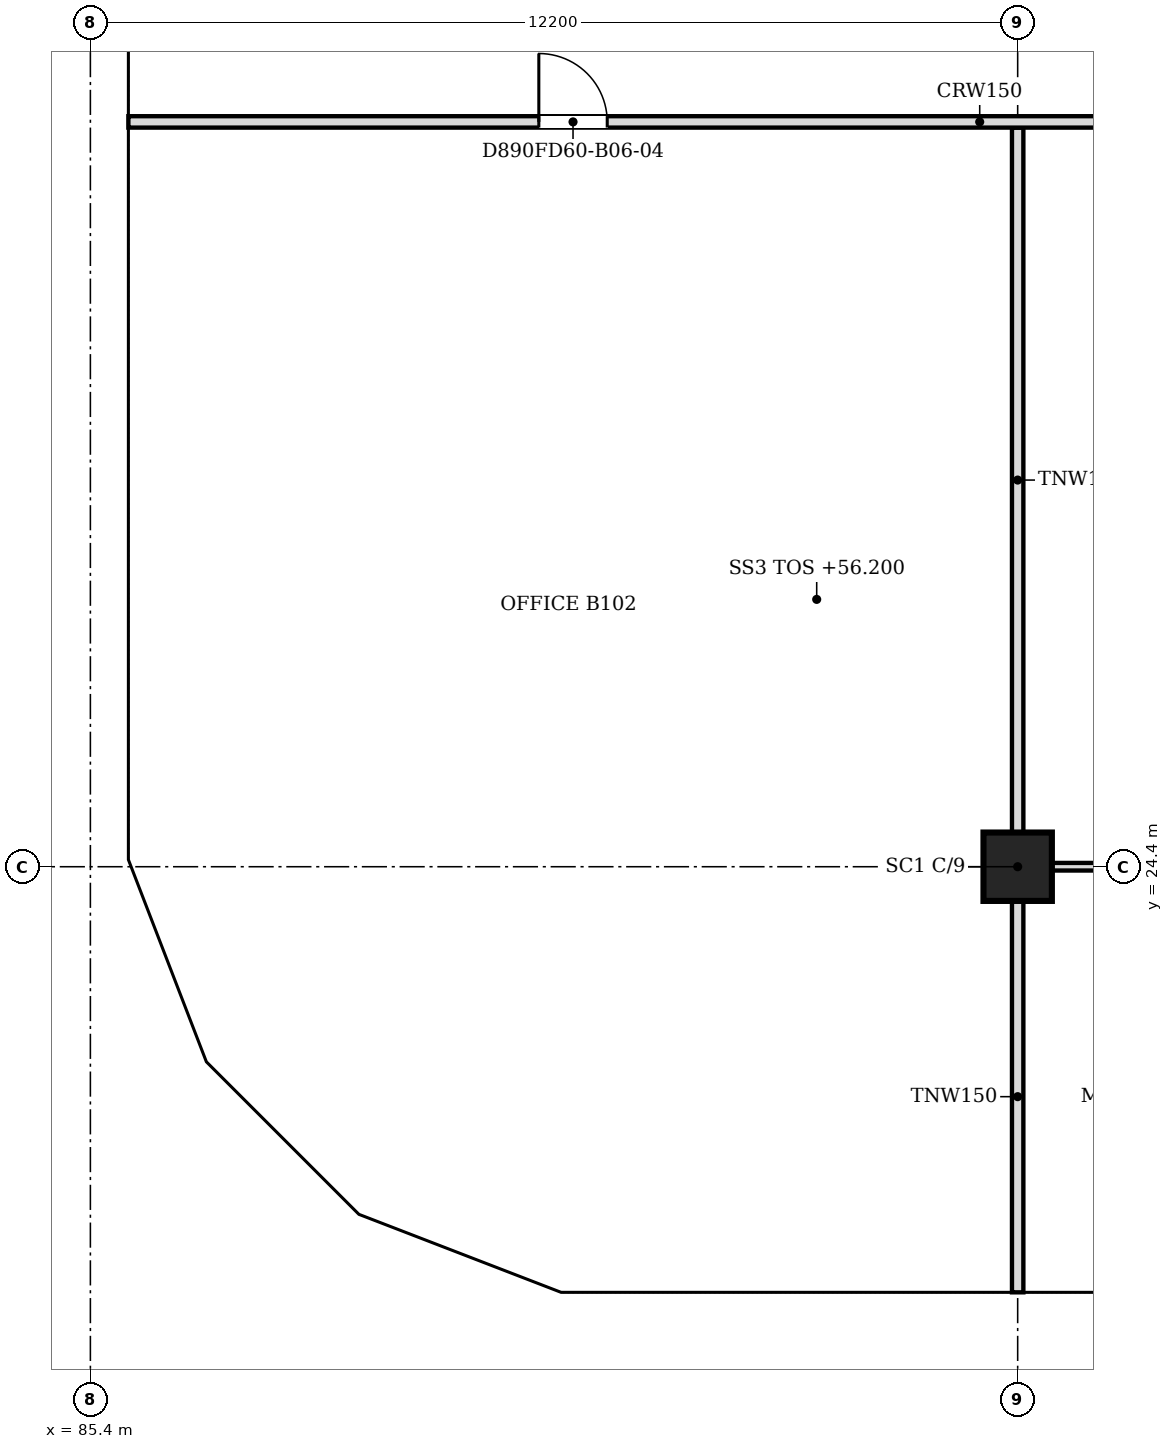
"""IFC4 building model, lengths in metres.
Left out: names, types, materials, properties, quantities, classifications, styles, units other than length and angle.
Written with IfcOpenShell. Run it as: python <this file> out.ifc"""

import sys

from ifc_helpers import new_model, si_unit, direction, frame, frame_2d, origin, origin_2d, place, context, subcontext, project, spatial, polyline, rectangle, outline, extrude, faceted_brep, source, transform, mapped, element, fill, save


model = new_model("IFC4")
c1 = context("Model", 3, precision=1e-05, world=origin(), true_north=direction((0.0, 1.0)))
c2 = subcontext(c1, "Body", "Model", "MODEL_VIEW")
j1 = project(units=[si_unit("LENGTHUNIT", "METRE"), si_unit("PLANEANGLEUNIT", "RADIAN")], contexts=[c1])
p1 = place(None, origin())
s1 = spatial("IfcSite", under=j1, at=p1, CompositionType="ELEMENT")
p2 = place(p1, origin())
s2 = spatial("IfcBuilding", under=s1, at=p2, CompositionType="ELEMENT")
p3 = place(p2, frame((0.0, 0.0, 56.2)))
s3 = spatial("IfcBuildingStorey", under=s2, at=p3, CompositionType="ELEMENT", Elevation=56.2)
p4 = place(p3, frame((97.6, 24.4, 0.0), z_axis=(0.0, 0.0, 1.0), x_axis=(1.0, 0.0, 0.0)))
e1 = element("IfcColumn", 1, at=p4, inside=s3, PredefinedType="COLUMN", context=c2, shape_type="SweptSolid", body=[
    extrude(rectangle(XDim=0.9, YDim=0.9, at=origin_2d()), origin(), (0.0, 0.0, 1.0), 3.6),
])
m1 = source(origin(), c2, "Body", "Brep", [
    faceted_brep([(0.047, -0.25, 0.0), (3.05, -0.25, 3.8), (0.047, -0.25, 7.6), (0.0, -0.25, 7.54), (0.0, -0.25, 0.06), (0.093, 0.25, 7.541), (3.05, 0.25, 3.8), (0.093, 0.25, 0.059), (0.047, 0.0, 0.0), (0.047, 0.0, 7.6)], [[[0, 1, 2, 3, 4]], [[5, 6, 7]], [[7, 6, 1, 0, 8]], [[6, 5, 9, 2, 1]], [[3, 2, 9]], [[8, 0, 4]], [[7, 8, 4, 3, 9, 5]]]),
])
p5 = place(p3, frame((91.5, 18.55, -3.8), z_axis=(0.0, 0.0, 1.0), x_axis=(1.0, 0.0, 0.0)))
e2 = element("IfcWall", 2, at=p5, inside=s3, PredefinedType="SOLIDWALL", context=c2, shape_type="MappedRepresentation", body=[
    mapped(m1, transform((0.0, 0.0, 0.0), scale=1.0)),
])
m2 = source(origin(), c2, "Body", "SweptSolid", [
    extrude(outline(polyline([(0.247, 0.656), (2.731, 3.8), (0.247, 6.944), (0.247, 0.656)])), frame((0.0, 0.26, 0.0), z_axis=(0.0, -1.0, 0.0), x_axis=(1.0, 0.0, 0.0)), (0.0, 0.0, 1.0), 0.52),
])
p6 = place(p5, origin())
e3 = element("IfcOpeningElement", 3, at=p6, cuts=e2, PredefinedType="OPENING", context=c2, shape_type="MappedRepresentation", body=[
    mapped(m2, transform((0.0, 0.0, 0.0), scale=1.0)),
])
m3 = source(origin(), c2, "Body", "Brep", [
    faceted_brep([(2.95, -0.25, 0.0), (2.997, -0.25, 0.059), (2.997, -0.25, 7.541), (2.95, -0.25, 7.6), (0.0, -0.25, 3.8), (0.053, 0.25, 3.868), (2.904, 0.25, 7.54), (2.904, 0.25, 0.06), (0.053, 0.25, 3.732), (2.95, 0.0, 0.0), (2.95, 0.0, 7.6), (0.0, 0.0, 3.8)], [[[0, 1, 2, 3, 4]], [[5, 6, 7, 8]], [[1, 0, 9]], [[10, 3, 2]], [[6, 5, 11, 4, 3, 10]], [[8, 7, 9, 0, 4, 11]], [[8, 11, 5]], [[1, 9, 7, 6, 10, 2]]]),
])
p7 = place(p3, frame((88.794, 19.612, -3.8), z_axis=(0.0, 0.0, 1.0), x_axis=(0.933000876937, -0.359874094142, 0.0)))
e4 = element("IfcWall", 4, at=p7, inside=s3, PredefinedType="SOLIDWALL", context=c2, shape_type="MappedRepresentation", body=[
    mapped(m3, transform((0.0, 0.0, 0.0), scale=1.0)),
])
m4 = source(origin(), c2, "Body", "SweptSolid", [
    extrude(outline(polyline([(2.75, 6.935), (0.316, 3.8), (2.75, 0.665), (2.75, 6.935)])), frame((0.0, 0.26, 0.0), z_axis=(0.0, -1.0, 0.0), x_axis=(1.0, 0.0, 0.0)), (0.0, 0.0, 1.0), 0.52),
])
p8 = place(p7, origin())
e5 = element("IfcOpeningElement", 5, at=p8, cuts=e4, PredefinedType="OPENING", context=c2, shape_type="MappedRepresentation", body=[
    mapped(m4, transform((0.0, 0.0, 0.0), scale=1.0)),
])
m5 = source(origin(), c2, "Body", "Brep", [
    faceted_brep([(3.05, -0.25, 0.0), (6.1, -0.25, 3.8), (6.1, -0.25, 3.8), (3.05, -0.25, 7.6), (0.0, -0.25, 3.8), (0.0, 0.25, 3.8), (3.05, 0.25, 7.6), (6.1, 0.25, 3.8), (6.1, 0.25, 3.8), (3.05, 0.25, 0.0)], [[[0, 1, 2, 3, 4]], [[5, 6, 7, 8, 9]], [[9, 8, 1, 0]], [[7, 6, 3, 2]], [[6, 5, 4, 3]], [[5, 9, 0, 4]], [[1, 8, 7, 2]]]),
])
p9 = place(p3, frame((94.55, 18.55, -3.8), z_axis=(0.0, 0.0, 1.0), x_axis=(1.0, 0.0, 0.0)))
e6 = element("IfcWall", 6, at=p9, inside=s3, PredefinedType="SOLIDWALL", context=c2, shape_type="MappedRepresentation", body=[
    mapped(m5, transform((0.0, 0.0, 0.0), scale=1.0)),
])
m6 = source(origin(), c2, "Body", "SweptSolid", [
    extrude(outline(polyline([(3.05, 0.399), (5.78, 3.8), (3.05, 7.201), (0.321, 3.8), (3.05, 0.399)])), frame((0.0, 0.26, 0.0), z_axis=(0.0, -1.0, 0.0), x_axis=(1.0, 0.0, 0.0)), (0.0, 0.0, 1.0), 0.52),
])
p10 = place(p9, origin())
e7 = element("IfcOpeningElement", 7, at=p10, cuts=e6, PredefinedType="OPENING", context=c2, shape_type="MappedRepresentation", body=[
    mapped(m6, transform((0.0, 0.0, 0.0), scale=1.0)),
])
m7 = source(origin(), c2, "Body", "SweptSolid", [
    extrude(outline(polyline([(3.05, 0.0), (6.1, 3.8), (3.05, 7.6), (0.0, 3.8), (3.05, 0.0)])), frame((0.0, 0.25, 0.0), z_axis=(0.0, -1.0, 0.0), x_axis=(1.0, 0.0, 0.0)), (0.0, 0.0, 1.0), 0.5),
])
p11 = place(p3, frame((85.65, 36.6, -3.8), z_axis=(0.0, 0.0, 1.0), x_axis=(0.0, -1.0, 0.0)))
e8 = element("IfcWall", 8, at=p11, inside=s3, PredefinedType="SOLIDWALL", context=c2, shape_type="MappedRepresentation", body=[
    mapped(m7, transform((0.0, 0.0, 0.0), scale=1.0)),
])
p12 = place(p11, origin())
e9 = element("IfcOpeningElement", 9, at=p12, cuts=e8, PredefinedType="OPENING", context=c2, shape_type="MappedRepresentation", body=[
    mapped(m6, transform((0.0, 0.0, 0.0), scale=1.0)),
])
m8 = source(origin(), c2, "Body", "Brep", [
    faceted_brep([(3.05, -0.25, 0.0), (6.053, -0.25, 3.8), (3.05, -0.25, 7.6), (0.0, -0.25, 3.8), (0.0, 0.25, 3.8), (3.05, 0.25, 7.6), (6.007, 0.25, 3.859), (6.007, 0.25, 3.741), (3.05, 0.25, 0.0), (6.053, 0.0, 3.8)], [[[0, 1, 2, 3]], [[4, 5, 6, 7, 8]], [[8, 7, 9, 1, 0]], [[6, 5, 2, 1, 9]], [[5, 4, 3, 2]], [[4, 8, 0, 3]], [[9, 7, 6]]]),
])
p13 = place(p3, frame((85.65, 30.5, -3.8), z_axis=(0.0, 0.0, 1.0), x_axis=(0.0, -1.0, 0.0)))
e10 = element("IfcWall", 10, at=p13, inside=s3, PredefinedType="SOLIDWALL", context=c2, shape_type="MappedRepresentation", body=[
    mapped(m8, transform((0.0, 0.0, 0.0), scale=1.0)),
])
m9 = source(origin(), c2, "Body", "SweptSolid", [
    extrude(outline(polyline([(3.049, 0.401), (5.735, 3.8), (3.049, 7.199), (0.321, 3.8), (3.049, 0.401)])), frame((0.0, 0.26, 0.0), z_axis=(0.0, -1.0, 0.0), x_axis=(1.0, 0.0, 0.0)), (0.0, 0.0, 1.0), 0.52),
])
p14 = place(p13, origin())
e11 = element("IfcOpeningElement", 11, at=p14, cuts=e10, PredefinedType="OPENING", context=c2, shape_type="MappedRepresentation", body=[
    mapped(m9, transform((0.0, 0.0, 0.0), scale=1.0)),
])
m10 = source(origin(), c2, "Body", "Brep", [
    faceted_brep([(2.95, -0.25, 0.0), (3.003, -0.25, 0.068), (3.003, -0.25, 7.532), (2.95, -0.25, 7.6), (0.0, -0.25, 3.8), (0.047, 0.25, 3.86), (2.898, 0.25, 7.532), (2.898, 0.25, 0.068), (0.047, 0.25, 3.74), (2.95, 0.0, 0.0), (2.95, 0.0, 7.6), (0.0, 0.0, 3.8)], [[[0, 1, 2, 3, 4]], [[5, 6, 7, 8]], [[1, 0, 9]], [[10, 3, 2]], [[6, 5, 11, 4, 3, 10]], [[8, 7, 9, 0, 4, 11]], [[8, 11, 5]], [[1, 9, 7, 6, 10, 2]]]),
])
p15 = place(p3, frame((85.65, 24.447, -3.8), z_axis=(0.0, 0.0, 1.0), x_axis=(0.35992665181, -0.932980602862, 0.0)))
e12 = element("IfcWall", 12, at=p15, inside=s3, PredefinedType="SOLIDWALL", context=c2, shape_type="MappedRepresentation", body=[
    mapped(m10, transform((0.0, 0.0, 0.0), scale=1.0)),
])
p16 = place(p15, origin())
e13 = element("IfcOpeningElement", 13, at=p16, cuts=e12, PredefinedType="OPENING", context=c2, shape_type="MappedRepresentation", body=[
    mapped(m4, transform((0.0, 0.0, 0.0), scale=1.0)),
])
m11 = source(origin(), c2, "Body", "Brep", [
    faceted_brep([(0.053, -0.25, 0.0), (2.997, -0.25, 3.8), (0.053, -0.25, 7.6), (0.0, -0.25, 7.532), (0.0, -0.25, 0.068), (0.106, 0.25, 7.532), (2.944, 0.25, 3.868), (2.944, 0.25, 3.732), (0.106, 0.25, 0.068), (2.997, 0.0, 3.8), (0.053, 0.0, 0.0), (0.053, 0.0, 7.6)], [[[0, 1, 2, 3, 4]], [[5, 6, 7, 8]], [[8, 7, 9, 1, 0, 10]], [[6, 5, 11, 2, 1, 9]], [[3, 2, 11]], [[10, 0, 4]], [[8, 10, 4, 3, 11, 5]], [[9, 7, 6]]]),
])
p17 = place(p3, frame((86.675, 21.731, -3.8), z_axis=(0.0, 0.0, 1.0), x_axis=(0.707106781187, -0.707106781187, 0.0)))
e14 = element("IfcWall", 14, at=p17, inside=s3, PredefinedType="SOLIDWALL", context=c2, shape_type="MappedRepresentation", body=[
    mapped(m11, transform((0.0, 0.0, 0.0), scale=1.0)),
])
m12 = source(origin(), c2, "Body", "SweptSolid", [
    extrude(outline(polyline([(0.253, 0.667), (2.681, 3.8), (0.253, 6.934), (0.253, 0.667)])), frame((0.0, 0.26, 0.0), z_axis=(0.0, -1.0, 0.0), x_axis=(1.0, 0.0, 0.0)), (0.0, 0.0, 1.0), 0.52),
])
p18 = place(p17, origin())
e15 = element("IfcOpeningElement", 15, at=p18, cuts=e14, PredefinedType="OPENING", context=c2, shape_type="MappedRepresentation", body=[
    mapped(m12, transform((0.0, 0.0, 0.0), scale=1.0)),
])
p19 = place(p2, frame((0.0, 0.0, 60.0)))
s4 = spatial("IfcBuildingStorey", under=s2, at=p19, CompositionType="ELEMENT", Elevation=60.0)
m13 = source(origin(), c2, "Body", "Brep", [
    faceted_brep([(3.003, -0.25, 0.0), (6.053, -0.25, 3.8), (3.003, -0.25, 7.6), (0.0, -0.25, 3.8), (0.047, 0.25, 3.859), (3.003, 0.25, 7.6), (6.053, 0.25, 3.8), (3.003, 0.25, 0.0), (0.047, 0.25, 3.741), (0.0, 0.0, 3.8)], [[[0, 1, 2, 3]], [[4, 5, 6, 7, 8]], [[7, 6, 1, 0]], [[6, 5, 2, 1]], [[5, 4, 9, 3, 2]], [[8, 7, 0, 3, 9]], [[8, 9, 4]]]),
])
p20 = place(p19, frame((91.547, 18.55, -3.8), z_axis=(0.0, 0.0, 1.0), x_axis=(1.0, 0.0, 0.0)))
e16 = element("IfcWall", 16, at=p20, inside=s4, PredefinedType="SOLIDWALL", context=c2, shape_type="MappedRepresentation", body=[
    mapped(m13, transform((0.0, 0.0, 0.0), scale=1.0)),
])
m14 = source(origin(), c2, "Body", "SweptSolid", [
    extrude(outline(polyline([(3.005, 0.401), (5.733, 3.8), (3.005, 7.199), (0.319, 3.8), (3.005, 0.401)])), frame((0.0, 0.26, 0.0), z_axis=(0.0, -1.0, 0.0), x_axis=(1.0, 0.0, 0.0)), (0.0, 0.0, 1.0), 0.52),
])
p21 = place(p20, origin())
e17 = element("IfcOpeningElement", 17, at=p21, cuts=e16, PredefinedType="OPENING", context=c2, shape_type="MappedRepresentation", body=[
    mapped(m14, transform((0.0, 0.0, 0.0), scale=1.0)),
])
p22 = place(p19, frame((97.6, 18.55, -3.8), z_axis=(0.0, 0.0, 1.0), x_axis=(1.0, 0.0, 0.0)))
e18 = element("IfcWall", 18, at=p22, inside=s4, PredefinedType="SOLIDWALL", context=c2, shape_type="MappedRepresentation", body=[
    mapped(m5, transform((0.0, 0.0, 0.0), scale=1.0)),
])
p23 = place(p22, origin())
e19 = element("IfcOpeningElement", 19, at=p23, cuts=e18, PredefinedType="OPENING", context=c2, shape_type="MappedRepresentation", body=[
    mapped(m6, transform((0.0, 0.0, 0.0), scale=1.0)),
])
p24 = place(p19, frame((85.65, 39.65, -3.8), z_axis=(0.0, 0.0, 1.0), x_axis=(0.0, -1.0, 0.0)))
e20 = element("IfcWall", 20, at=p24, inside=s4, PredefinedType="SOLIDWALL", context=c2, shape_type="MappedRepresentation", body=[
    mapped(m5, transform((0.0, 0.0, 0.0), scale=1.0)),
])
p25 = place(p24, origin())
e21 = element("IfcOpeningElement", 21, at=p25, cuts=e20, PredefinedType="OPENING", context=c2, shape_type="MappedRepresentation", body=[
    mapped(m6, transform((0.0, 0.0, 0.0), scale=1.0)),
])
p26 = place(p19, frame((85.65, 33.55, -3.8), z_axis=(0.0, 0.0, 1.0), x_axis=(0.0, -1.0, 0.0)))
e22 = element("IfcWall", 22, at=p26, inside=s4, PredefinedType="SOLIDWALL", context=c2, shape_type="MappedRepresentation", body=[
    mapped(m7, transform((0.0, 0.0, 0.0), scale=1.0)),
])
p27 = place(p26, origin())
e23 = element("IfcOpeningElement", 23, at=p27, cuts=e22, PredefinedType="OPENING", context=c2, shape_type="MappedRepresentation", body=[
    mapped(m6, transform((0.0, 0.0, 0.0), scale=1.0)),
])
m15 = source(origin(), c2, "Body", "Brep", [
    faceted_brep([(3.003, -0.25, 0.0), (3.05, -0.25, 0.06), (3.05, -0.25, 7.54), (3.003, -0.25, 7.6), (0.0, -0.25, 3.8), (0.0, 0.25, 3.8), (2.957, 0.25, 7.541), (2.957, 0.25, 0.059), (3.003, 0.0, 0.0), (3.003, 0.0, 7.6)], [[[0, 1, 2, 3, 4]], [[5, 6, 7]], [[1, 0, 8]], [[9, 3, 2]], [[6, 5, 4, 3, 9]], [[5, 7, 8, 0, 4]], [[1, 8, 7, 6, 9, 2]]]),
])
p28 = place(p19, frame((85.65, 27.45, -3.8), z_axis=(0.0, 0.0, 1.0), x_axis=(0.0, -1.0, 0.0)))
e24 = element("IfcWall", 24, at=p28, inside=s4, PredefinedType="SOLIDWALL", context=c2, shape_type="MappedRepresentation", body=[
    mapped(m15, transform((0.0, 0.0, 0.0), scale=1.0)),
])
m16 = source(origin(), c2, "Body", "SweptSolid", [
    extrude(outline(polyline([(2.803, 6.944), (0.319, 3.8), (2.803, 0.656), (2.803, 6.944)])), frame((0.0, 0.26, 0.0), z_axis=(0.0, -1.0, 0.0), x_axis=(1.0, 0.0, 0.0)), (0.0, 0.0, 1.0), 0.52),
])
p29 = place(p28, origin())
e25 = element("IfcOpeningElement", 25, at=p29, cuts=e24, PredefinedType="OPENING", context=c2, shape_type="MappedRepresentation", body=[
    mapped(m16, transform((0.0, 0.0, 0.0), scale=1.0)),
])
m17 = source(origin(), c2, "Body", "Brep", [
    faceted_brep([(0.047, -0.25, 0.0), (2.997, -0.25, 3.8), (0.047, -0.25, 7.6), (0.0, -0.25, 7.541), (0.0, -0.25, 0.059), (0.093, 0.25, 7.54), (2.944, 0.25, 3.868), (2.944, 0.25, 3.732), (0.093, 0.25, 0.06), (2.997, 0.0, 3.8), (0.047, 0.0, 0.0), (0.047, 0.0, 7.6)], [[[0, 1, 2, 3, 4]], [[5, 6, 7, 8]], [[8, 7, 9, 1, 0, 10]], [[6, 5, 11, 2, 1, 9]], [[3, 2, 11]], [[10, 0, 4]], [[8, 10, 4, 3, 11, 5]], [[9, 7, 6]]]),
])
p30 = place(p19, frame((85.633, 24.49, -3.8), z_axis=(0.0, 0.0, 1.0), x_axis=(0.359901446078, -0.932990326376, 0.0)))
e26 = element("IfcWall", 26, at=p30, inside=s4, PredefinedType="SOLIDWALL", context=c2, shape_type="MappedRepresentation", body=[
    mapped(m17, transform((0.0, 0.0, 0.0), scale=1.0)),
])
m18 = source(origin(), c2, "Body", "SweptSolid", [
    extrude(outline(polyline([(0.247, 0.665), (2.681, 3.8), (0.247, 6.935), (0.247, 0.665)])), frame((0.0, 0.26, 0.0), z_axis=(0.0, -1.0, 0.0), x_axis=(1.0, 0.0, 0.0)), (0.0, 0.0, 1.0), 0.52),
])
p31 = place(p30, origin())
e27 = element("IfcOpeningElement", 27, at=p31, cuts=e26, PredefinedType="OPENING", context=c2, shape_type="MappedRepresentation", body=[
    mapped(m18, transform((0.0, 0.0, 0.0), scale=1.0)),
])
m19 = source(origin(), c2, "Body", "Brep", [
    faceted_brep([(2.944, -0.25, 0.0), (2.997, -0.25, 0.068), (2.997, -0.25, 7.532), (2.944, -0.25, 7.6), (0.0, -0.25, 3.8), (0.053, 0.25, 3.868), (2.891, 0.25, 7.532), (2.891, 0.25, 0.068), (0.053, 0.25, 3.732), (2.944, 0.0, 0.0), (2.944, 0.0, 7.6), (0.0, 0.0, 3.8)], [[[0, 1, 2, 3, 4]], [[5, 6, 7, 8]], [[1, 0, 9]], [[10, 3, 2]], [[6, 5, 11, 4, 3, 10]], [[8, 7, 9, 0, 4, 11]], [[8, 11, 5]], [[1, 9, 7, 6, 10, 2]]]),
])
p32 = place(p19, frame((86.712, 21.694, -3.8), z_axis=(0.0, 0.0, 1.0), x_axis=(0.707066050402, -0.707147509625, 0.0)))
e28 = element("IfcWall", 28, at=p32, inside=s4, PredefinedType="SOLIDWALL", context=c2, shape_type="MappedRepresentation", body=[
    mapped(m19, transform((0.0, 0.0, 0.0), scale=1.0)),
])
m20 = source(origin(), c2, "Body", "SweptSolid", [
    extrude(outline(polyline([(2.744, 6.934), (0.316, 3.8), (2.744, 0.666), (2.744, 6.934)])), frame((0.0, 0.26, 0.0), z_axis=(0.0, -1.0, 0.0), x_axis=(1.0, 0.0, 0.0)), (0.0, 0.0, 1.0), 0.52),
])
p33 = place(p32, origin())
e29 = element("IfcOpeningElement", 29, at=p33, cuts=e28, PredefinedType="OPENING", context=c2, shape_type="MappedRepresentation", body=[
    mapped(m20, transform((0.0, 0.0, 0.0), scale=1.0)),
])
m21 = source(origin(), c2, "Body", "Brep", [
    faceted_brep([(0.053, -0.25, 0.0), (3.003, -0.25, 3.8), (0.053, -0.25, 7.6), (0.0, -0.25, 7.532), (0.0, -0.25, 0.068), (0.106, 0.25, 7.532), (2.957, 0.25, 3.86), (2.957, 0.25, 3.74), (0.106, 0.25, 0.068), (3.003, 0.0, 3.8), (0.053, 0.0, 0.0), (0.053, 0.0, 7.6)], [[[0, 1, 2, 3, 4]], [[5, 6, 7, 8]], [[8, 7, 9, 1, 0, 10]], [[6, 5, 11, 2, 1, 9]], [[3, 2, 11]], [[10, 0, 4]], [[8, 10, 4, 3, 11, 5]], [[9, 7, 6]]]),
])
p34 = place(p19, frame((88.744, 19.631, -3.8), z_axis=(0.0, 0.0, 1.0), x_axis=(0.932997369089, -0.359883188373, 0.0)))
e30 = element("IfcWall", 30, at=p34, inside=s4, PredefinedType="SOLIDWALL", context=c2, shape_type="MappedRepresentation", body=[
    mapped(m21, transform((0.0, 0.0, 0.0), scale=1.0)),
])
m22 = source(origin(), c2, "Body", "SweptSolid", [
    extrude(outline(polyline([(0.253, 0.665), (2.687, 3.8), (0.253, 6.935), (0.253, 0.665)])), frame((0.0, 0.26, 0.0), z_axis=(0.0, -1.0, 0.0), x_axis=(1.0, 0.0, 0.0)), (0.0, 0.0, 1.0), 0.52),
])
p35 = place(p34, origin())
e31 = element("IfcOpeningElement", 31, at=p35, cuts=e30, PredefinedType="OPENING", context=c2, shape_type="MappedRepresentation", body=[
    mapped(m22, transform((0.0, 0.0, 0.0), scale=1.0)),
])
p36 = place(p3, frame((97.6, 18.8, 0.0), z_axis=(0.0, 0.0, 1.0), x_axis=(0.0, 1.0, 0.0)))
e32 = element("IfcWall", 32, at=p36, inside=s3, PredefinedType="PARTITIONING", context=c2, shape_type="SweptSolid", body=[
    extrude(rectangle(XDim=5.149, YDim=0.15, at=frame_2d((2.574, 0.0))), origin(), (0.0, 0.0, 1.0), 3.067),
])
p37 = place(p3, frame((102.211, 24.4, 0.0), z_axis=(0.0, 0.0, 1.0), x_axis=(-1.0, 0.0, 0.0)))
e33 = element("IfcWall", 33, at=p37, inside=s3, PredefinedType="PARTITIONING", context=c2, shape_type="SweptSolid", body=[
    extrude(rectangle(XDim=4.16, YDim=0.1, at=frame_2d((2.08, 0.0))), origin(), (0.0, 0.0, 1.0), 3.067),
])
m23 = source(origin(), c2, "Body", "SweptSolid", [
    extrude(rectangle(XDim=0.9, YDim=2.1, at=frame_2d((0.45, 1.05))), frame((0.0, 0.06, 0.0), z_axis=(0.0, -1.0, 0.0), x_axis=(1.0, 0.0, 0.0)), (0.0, 0.0, 1.0), 0.12),
])
p38 = place(p37, frame((1.66, 0.0, 0.0)))
e34 = element("IfcOpeningElement", 34, at=p38, cuts=e33, PredefinedType="OPENING", context=c2, shape_type="MappedRepresentation", body=[
    mapped(m23, transform((0.0, 0.0, 0.0), scale=1.0)),
])
p39 = place(p3, frame((97.6, 24.851, 0.0), z_axis=(0.0, 0.0, 1.0), x_axis=(0.0, 1.0, 0.0)))
e35 = element("IfcWall", 35, at=p39, inside=s3, PredefinedType="PARTITIONING", context=c2, shape_type="SweptSolid", body=[
    extrude(rectangle(XDim=9.273, YDim=0.15, at=frame_2d((4.636, 0.0))), origin(), (0.0, 0.0, 1.0), 3.067),
])
p40 = place(p3, frame((133.7, 34.2, 0.0), z_axis=(0.0, 0.0, 1.0), x_axis=(-1.0, 0.0, 0.0)))
e36 = element("IfcWall", 36, at=p40, inside=s3, PredefinedType="PARTITIONING", context=c2, shape_type="SweptSolid", body=[
    extrude(rectangle(XDim=47.8, YDim=0.15, at=frame_2d((23.9, 0.0))), origin(), (0.0, 0.0, 1.0), 3.067),
])
m24 = source(origin(), c2, "Body", "SweptSolid", [
    extrude(rectangle(XDim=0.9, YDim=2.1, at=frame_2d((0.45, 1.05))), frame((0.0, 0.085, 0.0), z_axis=(0.0, -1.0, 0.0), x_axis=(1.0, 0.0, 0.0)), (0.0, 0.0, 1.0), 0.17),
])
p41 = place(p40, frame((22.949, 0.0, 0.0)))
e37 = element("IfcOpeningElement", 37, at=p41, cuts=e36, PredefinedType="OPENING", context=c2, shape_type="MappedRepresentation", body=[
    mapped(m24, transform((0.0, 0.0, 0.0), scale=1.0)),
])
p42 = place(p40, frame((3.649, 0.0, 0.0)))
e38 = element("IfcOpeningElement", 38, at=p42, cuts=e36, PredefinedType="OPENING", context=c2, shape_type="MappedRepresentation", body=[
    mapped(m24, transform((0.0, 0.0, 0.0), scale=1.0)),
])
p43 = place(p40, frame((30.799, 0.0, 0.0)))
e39 = element("IfcOpeningElement", 39, at=p43, cuts=e36, PredefinedType="OPENING", context=c2, shape_type="MappedRepresentation", body=[
    mapped(m24, transform((0.0, 0.0, 0.0), scale=1.0)),
])
p44 = place(p40, frame((41.5, 0.0, 0.0)))
e40 = element("IfcOpeningElement", 40, at=p44, cuts=e36, PredefinedType="OPENING", context=c2, shape_type="MappedRepresentation", body=[
    mapped(m24, transform((0.0, 0.0, 0.0), scale=1.0)),
])
p45 = place(p40, frame((13.85, 0.0, 0.0)))
e41 = element("IfcOpeningElement", 41, at=p45, cuts=e36, PredefinedType="OPENING", context=c2, shape_type="MappedRepresentation", body=[
    mapped(m24, transform((0.0, 0.0, 0.0), scale=1.0)),
])
m25 = source(origin(), c2, "Body", "SweptSolid", [
    extrude(rectangle(XDim=0.9, YDim=2.1, at=frame_2d((0.45, 1.05))), frame((0.0, 0.025, 0.0), z_axis=(0.0, -1.0, 0.0), x_axis=(1.0, 0.0, 0.0)), (0.0, 0.0, 1.0), 0.05),
])
p46 = place(p44, origin())
e42 = element("IfcDoor", 42, at=p46, inside=s3, OperationType="SINGLE_SWING_RIGHT", PredefinedType="DOOR", context=c2, shape_type="MappedRepresentation", body=[
    mapped(m25, transform((0.0, 0.0, 0.0), scale=1.0)),
])
fill(e40, e42)
save(model, sys.argv[1])
